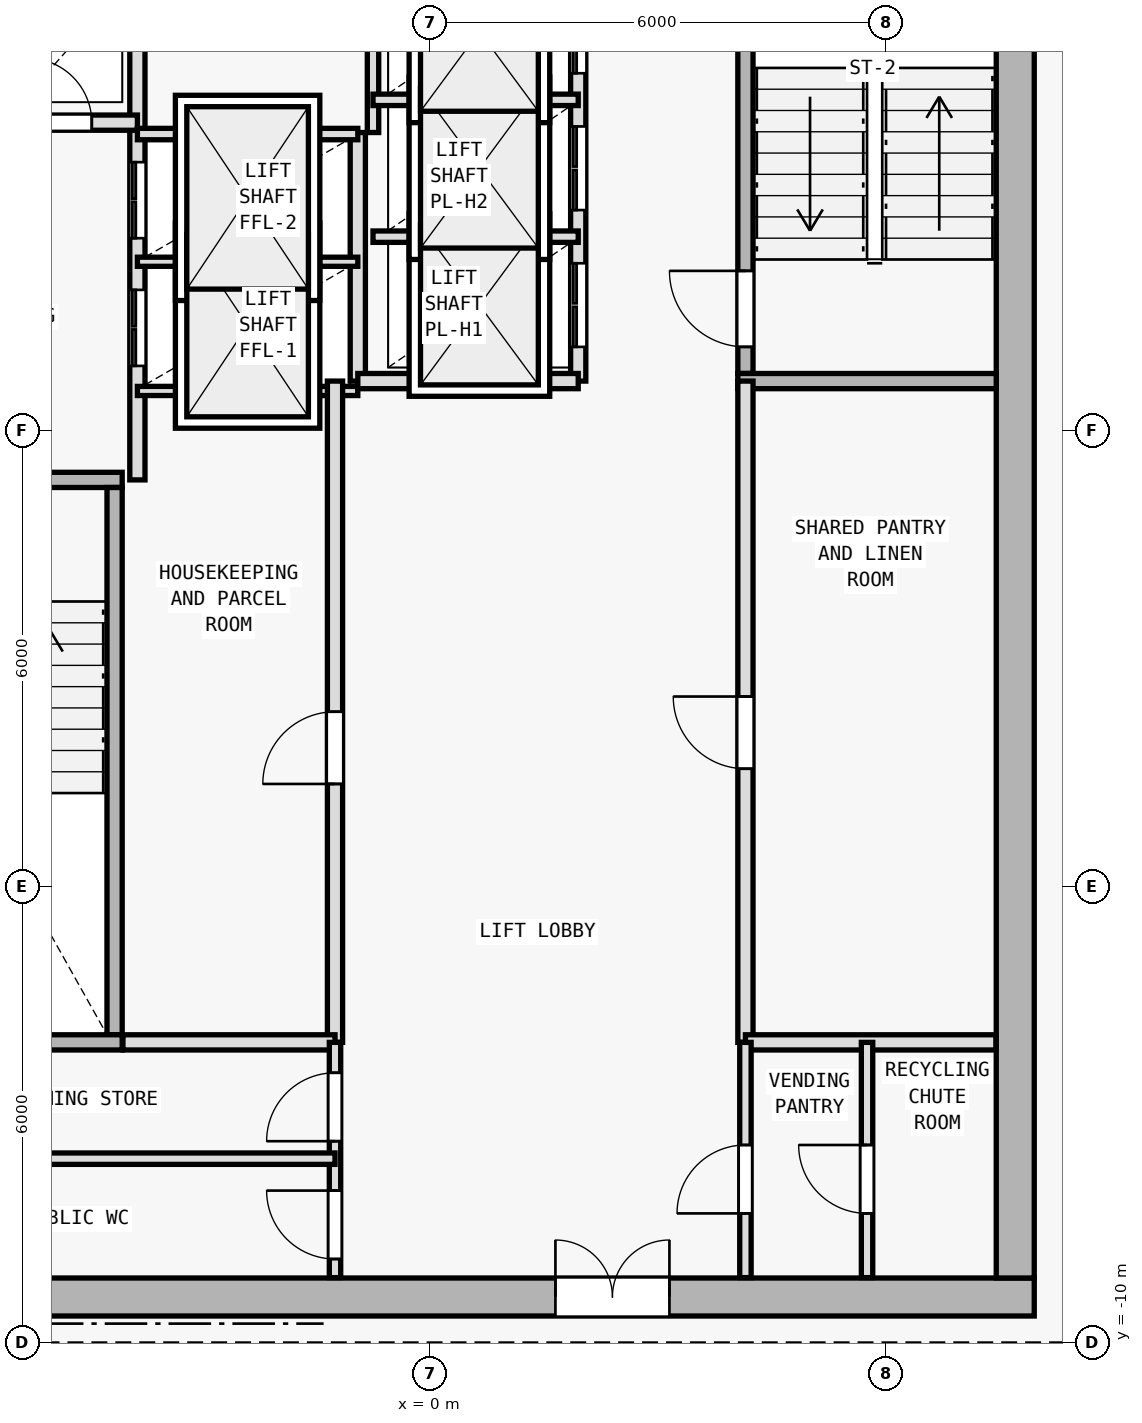
"""IFC4 building model, lengths in metres.
Left out: names, types, materials, properties, quantities, classifications, styles, units other than length and angle.
Written with IfcOpenShell. Run it as: python <this file> out.ifc"""

import sys

from ifc_helpers import new_model, si_unit, direction, frame, frame_2d, origin, origin_2d, place, context, subcontext, project, spatial, rectangle, i_section, extrude, element, fill, save


model = new_model("IFC4")
c1 = context("Model", 3, precision=1e-05, world=origin(), true_north=direction((0.0, 1.0)))
c2 = subcontext(c1, "Body", "Model", "MODEL_VIEW")
j1 = project(units=[si_unit("LENGTHUNIT", "METRE"), si_unit("PLANEANGLEUNIT", "RADIAN")], contexts=[c1])
p1 = place(None, origin())
s1 = spatial("IfcSite", under=j1, at=p1, CompositionType="ELEMENT")
p2 = place(p1, origin())
s2 = spatial("IfcBuilding", under=s1, at=p2, CompositionType="ELEMENT")
p3 = place(p2, frame((0.0, 0.0, 286.8)))
s3 = spatial("IfcBuildingStorey", under=s2, at=p3, CompositionType="ELEMENT", Elevation=286.8)
for number, where, z_axis, x_axis in (
    (1, (7.7, -9.4, 0.0), (0.0, 0.0, 1.0), (1.0, 0.0, 0.0)),
    (2, (0.0, -9.4, 0.0), (0.0, 0.0, 1.0), (1.0, 0.0, 0.0)),
    (3, (7.7, 0.4, 0.0), (0.0, 0.0, 1.0), (1.0, 0.0, 0.0)),
):
    element("IfcColumn", number, at=place(p3, frame(where, z_axis=z_axis, x_axis=x_axis)), inside=s3, PredefinedType="COLUMN", context=c2, shape_type="SweptSolid", body=[
        extrude(i_section(OverallWidth=0.374, OverallDepth=0.372, WebThickness=0.012, FlangeThickness=0.02, FilletRadius=0.015, at=origin_2d()), origin(), (0.0, 0.0, 1.0), 3.6),
    ])
p4 = place(p3, frame((-7.95, -9.4, 0.0), z_axis=(0.0, 0.0, 1.0), x_axis=(1.0, 0.0, 0.0)))
e4 = element("IfcWall", 4, at=p4, inside=s3, PredefinedType="SHEAR", context=c2, shape_type="SweptSolid", body=[
    extrude(rectangle(XDim=15.9, YDim=0.5, at=frame_2d((7.95, 0.0))), origin(), (0.0, 0.0, 1.0), 3.35),
])
p5 = place(p4, frame((9.6, 0.0, 0.0)))
e5 = element("IfcOpeningElement", 5, at=p5, cuts=e4, PredefinedType="OPENING", context=c2, shape_type="SweptSolid", body=[
    extrude(rectangle(XDim=1.5, YDim=2.2, at=frame_2d((0.75, 1.1))), frame((0.0, 0.26, 0.0), z_axis=(0.0, -1.0, 0.0), x_axis=(1.0, 0.0, 0.0)), (0.0, 0.0, 1.0), 0.52),
])
p6 = place(p3, frame((7.7, 9.95, 0.0), z_axis=(0.0, 0.0, 1.0), x_axis=(0.0, -1.0, 0.0)))
e6 = element("IfcWall", 6, at=p6, inside=s3, PredefinedType="SHEAR", context=c2, shape_type="SweptSolid", body=[
    extrude(rectangle(XDim=19.1, YDim=0.5, at=frame_2d((9.55, 0.0))), origin(), (0.0, 0.0, 1.0), 3.35),
])
p7 = place(p3, frame((-7.45, 1.35, 0.0), z_axis=(0.0, 0.0, 1.0), x_axis=(1.0, 0.0, 0.0)))
e7 = element("IfcWall", 7, at=p7, inside=s3, PredefinedType="SOLIDWALL", context=c2, shape_type="SweptSolid", body=[
    extrude(rectangle(XDim=3.4, YDim=0.2, at=frame_2d((1.7, 0.0))), origin(), (0.0, 0.0, 1.0), 3.35),
])
p8 = place(p7, frame((0.65, 0.0, 0.0)))
e8 = element("IfcOpeningElement", 8, at=p8, cuts=e7, PredefinedType="OPENING", context=c2, shape_type="SweptSolid", body=[
    extrude(rectangle(XDim=1.0, YDim=2.15, at=frame_2d((0.5, 1.075))), frame((0.0, 0.11, 0.0), z_axis=(0.0, -1.0, 0.0), x_axis=(1.0, 0.0, 0.0)), (0.0, 0.0, 1.0), 0.22),
])
p9 = place(p3, frame((-4.15, -5.95, 0.0), z_axis=(0.0, 0.0, 1.0), x_axis=(0.0, 1.0, 0.0)))
e9 = element("IfcWall", 9, at=p9, inside=s3, PredefinedType="SOLIDWALL", context=c2, shape_type="SweptSolid", body=[
    extrude(rectangle(XDim=7.2, YDim=0.2, at=frame_2d((3.6, 0.0))), origin(), (0.0, 0.0, 1.0), 3.35),
])
p10 = place(p3, frame((-3.85, 1.35, 0.0), z_axis=(0.0, 0.0, 1.0), x_axis=(0.0, 1.0, 0.0)))
e10 = element("IfcWall", 10, at=p10, inside=s3, PredefinedType="SOLIDWALL", context=c2, shape_type="SweptSolid", body=[
    extrude(rectangle(XDim=8.595, YDim=0.2, at=frame_2d((4.297, 0.0))), origin(), (0.0, 0.0, 1.0), 3.35),
])
p11 = place(p10, frame((1.5, 0.0, 0.0)))
e11 = element("IfcOpeningElement", 11, at=p11, cuts=e10, PredefinedType="OPENING", context=c2, shape_type="SweptSolid", body=[
    extrude(rectangle(XDim=1.0, YDim=2.15, at=frame_2d((0.5, 1.075))), frame((0.0, 0.11, 0.0), z_axis=(0.0, -1.0, 0.0), x_axis=(1.0, 0.0, 0.0)), (0.0, 0.0, 1.0), 0.22),
])
p12 = place(p10, frame((3.18, 0.0, 0.0)))
e12 = element("IfcOpeningElement", 12, at=p12, cuts=e10, PredefinedType="OPENING", context=c2, shape_type="SweptSolid", body=[
    extrude(rectangle(XDim=1.0, YDim=2.15, at=frame_2d((0.5, 1.075))), frame((0.0, 0.11, 0.0), z_axis=(0.0, -1.0, 0.0), x_axis=(1.0, 0.0, 0.0)), (0.0, 0.0, 1.0), 0.22),
])
p13 = place(p3, frame((-7.445, 6.05, 0.0), z_axis=(0.0, 0.0, 1.0), x_axis=(1.0, 0.0, 0.0)))
e13 = element("IfcWall", 13, at=p13, inside=s3, PredefinedType="SOLIDWALL", context=c2, shape_type="SweptSolid", body=[
    extrude(rectangle(XDim=3.595, YDim=0.2, at=frame_2d((1.797, 0.0))), origin(), (0.0, 0.0, 1.0), 3.35),
])
p14 = place(p13, frame((0.345, 0.0, 0.0)))
e14 = element("IfcOpeningElement", 14, at=p14, cuts=e13, PredefinedType="OPENING", context=c2, shape_type="SweptSolid", body=[
    extrude(rectangle(XDim=0.85, YDim=2.1, at=frame_2d((0.425, 1.05))), frame((0.0, 0.11, 0.0), z_axis=(0.0, -1.0, 0.0), x_axis=(1.0, 0.0, 0.0)), (0.0, 0.0, 1.0), 0.22),
])
p15 = place(p13, frame((2.145, 0.0, 0.0)))
e15 = element("IfcOpeningElement", 15, at=p15, cuts=e13, PredefinedType="OPENING", context=c2, shape_type="SweptSolid", body=[
    extrude(rectangle(XDim=0.85, YDim=2.1, at=frame_2d((0.425, 1.05))), frame((0.0, 0.11, 0.0), z_axis=(0.0, -1.0, 0.0), x_axis=(1.0, 0.0, 0.0)), (0.0, 0.0, 1.0), 0.22),
])
p16 = place(p3, frame((4.15, 2.75, 0.0), z_axis=(0.0, 0.0, 1.0), x_axis=(0.0, 1.0, 0.0)))
e16 = element("IfcWall", 16, at=p16, inside=s3, PredefinedType="SOLIDWALL", context=c2, shape_type="SweptSolid", body=[
    extrude(rectangle(XDim=7.2, YDim=0.2, at=frame_2d((3.6, 0.0))), origin(), (0.0, 0.0, 1.0), 3.35),
])
p17 = place(p16, frame((0.35, 0.0, 0.0)))
e17 = element("IfcOpeningElement", 17, at=p17, cuts=e16, PredefinedType="OPENING", context=c2, shape_type="SweptSolid", body=[
    extrude(rectangle(XDim=1.0, YDim=2.15, at=frame_2d((0.5, 1.075))), frame((0.0, 0.11, 0.0), z_axis=(0.0, -1.0, 0.0), x_axis=(1.0, 0.0, 0.0)), (0.0, 0.0, 1.0), 0.22),
])
p18 = place(p3, frame((4.05, 2.65, 0.0), z_axis=(0.0, 0.0, 1.0), x_axis=(1.0, 0.0, 0.0)))
e18 = element("IfcWall", 18, at=p18, inside=s3, PredefinedType="SOLIDWALL", context=c2, shape_type="SweptSolid", body=[
    extrude(rectangle(XDim=3.4, YDim=0.2, at=frame_2d((1.7, 0.0))), origin(), (0.0, 0.0, 1.0), 3.35),
])
p19 = place(p3, frame((-0.95, 2.65, 0.0), z_axis=(0.0, 0.0, 1.0), x_axis=(0.0, 1.0, 0.0)))
e19 = element("IfcWall", 19, at=p19, inside=s3, PredefinedType="SOLIDWALL", context=c2, shape_type="SweptSolid", body=[
    extrude(rectangle(XDim=3.27, YDim=0.2, at=frame_2d((1.635, 0.0))), origin(), (0.0, 0.0, 1.0), 3.35),
])
for number, where, z_axis, x_axis in (
    (20, (-3.85, 2.52, 0.0), (0.0, 0.0, 1.0), (1.0, 0.0, 0.0)),
    (21, (-3.85, 4.22, 0.0), (0.0, 0.0, 1.0), (1.0, 0.0, 0.0)),
):
    element("IfcWall", number, at=place(p3, frame(where, z_axis=z_axis, x_axis=x_axis)), inside=s3, PredefinedType="PARTITIONING", context=c2, shape_type="SweptSolid", body=[
        extrude(rectangle(XDim=2.9, YDim=0.12, at=frame_2d((1.45, 0.0))), origin(), (0.0, 0.0, 1.0), 3.35),
    ])
p20 = place(p3, frame((-3.85, 5.9, 0.0), z_axis=(0.0, 0.0, 1.0), x_axis=(1.0, 0.0, 0.0)))
e22 = element("IfcWall", 22, at=p20, inside=s3, PredefinedType="PARTITIONING", context=c2, shape_type="SweptSolid", body=[
    extrude(rectangle(XDim=2.9, YDim=0.15, at=frame_2d((1.45, 0.0))), origin(), (0.0, 0.0, 1.0), 3.35),
])
p21 = place(p3, frame((4.15, -6.05, 0.0), z_axis=(0.0, 0.0, 1.0), x_axis=(0.0, 1.0, 0.0)))
e23 = element("IfcWall", 23, at=p21, inside=s3, PredefinedType="SOLIDWALL", context=c2, shape_type="SweptSolid", body=[
    extrude(rectangle(XDim=8.7, YDim=0.2, at=frame_2d((4.35, 0.0))), origin(), (0.0, 0.0, 1.0), 3.35),
])
p22 = place(p21, frame((3.6, 0.0, 0.0)))
e24 = element("IfcOpeningElement", 24, at=p22, cuts=e23, PredefinedType="OPENING", context=c2, shape_type="SweptSolid", body=[
    extrude(rectangle(XDim=0.95, YDim=2.1, at=frame_2d((0.475, 1.05))), frame((0.0, 0.11, 0.0), z_axis=(0.0, -1.0, 0.0), x_axis=(1.0, 0.0, 0.0)), (0.0, 0.0, 1.0), 0.22),
])
p23 = place(p3, frame((-1.25, -6.05, 0.0), z_axis=(0.0, 0.0, 1.0), x_axis=(0.0, 1.0, 0.0)))
e25 = element("IfcWall", 25, at=p23, inside=s3, PredefinedType="SOLIDWALL", context=c2, shape_type="SweptSolid", body=[
    extrude(rectangle(XDim=8.7, YDim=0.2, at=frame_2d((4.35, 0.0))), origin(), (0.0, 0.0, 1.0), 3.35),
])
p24 = place(p23, frame((3.4, 0.0, 0.0)))
e26 = element("IfcOpeningElement", 26, at=p24, cuts=e25, PredefinedType="OPENING", context=c2, shape_type="SweptSolid", body=[
    extrude(rectangle(XDim=0.95, YDim=2.1, at=frame_2d((0.475, 1.05))), frame((0.0, 0.11, 0.0), z_axis=(0.0, -1.0, 0.0), x_axis=(1.0, 0.0, 0.0)), (0.0, 0.0, 1.0), 0.22),
])
p25 = place(p3, frame((1.95, 2.65, 0.0), z_axis=(0.0, 0.0, 1.0), x_axis=(0.0, 1.0, 0.0)))
e27 = element("IfcWall", 27, at=p25, inside=s3, PredefinedType="SOLIDWALL", context=c2, shape_type="SweptSolid", body=[
    extrude(rectangle(XDim=7.295, YDim=0.2, at=frame_2d((3.647, 0.0))), origin(), (0.0, 0.0, 1.0), 3.35),
])
p26 = place(p25, frame((0.45, 0.0, 0.0)))
e28 = element("IfcOpeningElement", 28, at=p26, cuts=e27, PredefinedType="OPENING", context=c2, shape_type="SweptSolid", body=[
    extrude(rectangle(XDim=1.1, YDim=2.15, at=frame_2d((0.55, 1.075))), frame((0.0, 0.11, 0.0), z_axis=(0.0, -1.0, 0.0), x_axis=(1.0, 0.0, 0.0)), (0.0, 0.0, 1.0), 0.22),
])
p27 = place(p25, frame((2.25, 0.0, 0.0)))
e29 = element("IfcOpeningElement", 29, at=p27, cuts=e27, PredefinedType="OPENING", context=c2, shape_type="SweptSolid", body=[
    extrude(rectangle(XDim=1.1, YDim=2.15, at=frame_2d((0.55, 1.075))), frame((0.0, 0.11, 0.0), z_axis=(0.0, -1.0, 0.0), x_axis=(1.0, 0.0, 0.0)), (0.0, 0.0, 1.0), 0.22),
])
p28 = place(p25, frame((4.05, 0.0, 0.0)))
e30 = element("IfcOpeningElement", 30, at=p28, cuts=e27, PredefinedType="OPENING", context=c2, shape_type="SweptSolid", body=[
    extrude(rectangle(XDim=1.1, YDim=2.15, at=frame_2d((0.55, 1.075))), frame((0.0, 0.11, 0.0), z_axis=(0.0, -1.0, 0.0), x_axis=(1.0, 0.0, 0.0)), (0.0, 0.0, 1.0), 0.22),
])
p29 = place(p25, frame((5.85, 0.0, 0.0)))
e31 = element("IfcOpeningElement", 31, at=p29, cuts=e27, PredefinedType="OPENING", context=c2, shape_type="SweptSolid", body=[
    extrude(rectangle(XDim=1.1, YDim=2.15, at=frame_2d((0.55, 1.075))), frame((0.0, 0.11, 0.0), z_axis=(0.0, -1.0, 0.0), x_axis=(1.0, 0.0, 0.0)), (0.0, 0.0, 1.0), 0.22),
])
p30 = place(p3, frame((-0.95, 2.65, 0.0), z_axis=(0.0, 0.0, 1.0), x_axis=(1.0, 0.0, 0.0)))
e32 = element("IfcWall", 32, at=p30, inside=s3, PredefinedType="SOLIDWALL", context=c2, shape_type="SweptSolid", body=[
    extrude(rectangle(XDim=2.9, YDim=0.2, at=frame_2d((1.45, 0.0))), origin(), (0.0, 0.0, 1.0), 3.35),
])
p31 = place(p3, frame((-0.75, 5.92, 0.0), z_axis=(0.0, 0.0, 1.0), x_axis=(0.0, 1.0, 0.0)))
e33 = element("IfcWall", 33, at=p31, inside=s3, PredefinedType="PARTITIONING", context=c2, shape_type="SweptSolid", body=[
    extrude(rectangle(XDim=4.025, YDim=0.15, at=frame_2d((2.013, 0.0))), origin(), (0.0, 0.0, 1.0), 3.35),
])
for number, where, z_axis, x_axis in (
    (34, (-0.75, 4.55, 0.0), (0.0, 0.0, 1.0), (1.0, 0.0, 0.0)),
    (35, (-0.75, 6.35, 0.0), (0.0, 0.0, 1.0), (1.0, 0.0, 0.0)),
):
    element("IfcWall", number, at=place(p3, frame(where, z_axis=z_axis, x_axis=x_axis)), inside=s3, PredefinedType="PARTITIONING", context=c2, shape_type="SweptSolid", body=[
        extrude(rectangle(XDim=2.7, YDim=0.15, at=frame_2d((1.35, 0.0))), origin(), (0.0, 0.0, 1.0), 3.35),
    ])
p32 = place(p3, frame((-7.45, -6.05, 0.0), z_axis=(0.0, 0.0, 1.0), x_axis=(1.0, 0.0, 0.0)))
e36 = element("IfcWall", 36, at=p32, inside=s3, PredefinedType="SOLIDWALL", context=c2, shape_type="SweptSolid", body=[
    extrude(rectangle(XDim=3.4, YDim=0.2, at=frame_2d((1.7, 0.0))), origin(), (0.0, 0.0, 1.0), 3.35),
])
p33 = place(p3, frame((-4.04, -6.05, 0.0), z_axis=(0.0, 0.0, 1.0), x_axis=(1.0, 0.0, 0.0)))
e37 = element("IfcWall", 37, at=p33, inside=s3, PredefinedType="SOLIDWALL", context=c2, shape_type="SweptSolid", body=[
    extrude(rectangle(XDim=2.79, YDim=0.2, at=frame_2d((1.395, 0.0))), origin(), (0.0, 0.0, 1.0), 3.35),
])
p34 = place(p3, frame((4.15, -6.05, 0.0), z_axis=(0.0, 0.0, 1.0), x_axis=(1.0, 0.0, 0.0)))
e38 = element("IfcWall", 38, at=p34, inside=s3, PredefinedType="SOLIDWALL", context=c2, shape_type="SweptSolid", body=[
    extrude(rectangle(XDim=3.295, YDim=0.2, at=frame_2d((1.647, 0.0))), origin(), (0.0, 0.0, 1.0), 3.35),
])
p35 = place(p3, frame((-1.25, -9.145, 0.0), z_axis=(0.0, 0.0, 1.0), x_axis=(0.0, 1.0, 0.0)))
e39 = element("IfcWall", 39, at=p35, inside=s3, PredefinedType="PARTITIONING", context=c2, shape_type="SweptSolid", body=[
    extrude(rectangle(XDim=3.095, YDim=0.15, at=frame_2d((1.547, 0.0))), origin(), (0.0, 0.0, 1.0), 3.35),
])
p36 = place(p35, frame((1.795, 0.0, 0.0)))
e40 = element("IfcOpeningElement", 40, at=p36, cuts=e39, PredefinedType="OPENING", context=c2, shape_type="SweptSolid", body=[
    extrude(rectangle(XDim=0.9, YDim=2.1, at=frame_2d((0.45, 1.05))), frame((0.0, 0.085, 0.0), z_axis=(0.0, -1.0, 0.0), x_axis=(1.0, 0.0, 0.0)), (0.0, 0.0, 1.0), 0.17),
])
p37 = place(p35, frame((0.245, 0.0, 0.0)))
e41 = element("IfcOpeningElement", 41, at=p37, cuts=e39, PredefinedType="OPENING", context=c2, shape_type="SweptSolid", body=[
    extrude(rectangle(XDim=0.9, YDim=2.1, at=frame_2d((0.45, 1.05))), frame((0.0, 0.085, 0.0), z_axis=(0.0, -1.0, 0.0), x_axis=(1.0, 0.0, 0.0)), (0.0, 0.0, 1.0), 0.17),
])
p38 = place(p3, frame((4.15, -9.145, 0.0), z_axis=(0.0, 0.0, 1.0), x_axis=(0.0, 1.0, 0.0)))
e42 = element("IfcWall", 42, at=p38, inside=s3, PredefinedType="PARTITIONING", context=c2, shape_type="SweptSolid", body=[
    extrude(rectangle(XDim=3.095, YDim=0.15, at=frame_2d((1.547, 0.0))), origin(), (0.0, 0.0, 1.0), 3.35),
])
p39 = place(p38, frame((0.845, 0.0, 0.0)))
e43 = element("IfcOpeningElement", 43, at=p39, cuts=e42, PredefinedType="OPENING", context=c2, shape_type="SweptSolid", body=[
    extrude(rectangle(XDim=0.9, YDim=2.1, at=frame_2d((0.45, 1.05))), frame((0.0, 0.085, 0.0), z_axis=(0.0, -1.0, 0.0), x_axis=(1.0, 0.0, 0.0)), (0.0, 0.0, 1.0), 0.17),
])
p40 = place(p3, frame((-7.445, -7.58, 0.0), z_axis=(0.0, 0.0, 1.0), x_axis=(1.0, 0.0, 0.0)))
e44 = element("IfcWall", 44, at=p40, inside=s3, PredefinedType="PARTITIONING", context=c2, shape_type="SweptSolid", body=[
    extrude(rectangle(XDim=6.195, YDim=0.15, at=frame_2d((3.098, 0.0))), origin(), (0.0, 0.0, 1.0), 3.35),
])
p41 = place(p3, frame((5.75, -9.145, 0.0), z_axis=(0.0, 0.0, 1.0), x_axis=(0.0, 1.0, 0.0)))
e45 = element("IfcWall", 45, at=p41, inside=s3, PredefinedType="PARTITIONING", context=c2, shape_type="SweptSolid", body=[
    extrude(rectangle(XDim=3.095, YDim=0.15, at=frame_2d((1.547, 0.0))), origin(), (0.0, 0.0, 1.0), 3.35),
])
p42 = place(p41, frame((0.845, 0.0, 0.0)))
e46 = element("IfcOpeningElement", 46, at=p42, cuts=e45, PredefinedType="OPENING", context=c2, shape_type="SweptSolid", body=[
    extrude(rectangle(XDim=0.9, YDim=2.1, at=frame_2d((0.45, 1.05))), frame((0.0, 0.085, 0.0), z_axis=(0.0, -1.0, 0.0), x_axis=(1.0, 0.0, 0.0)), (0.0, 0.0, 1.0), 0.17),
])
p43 = place(p5, origin())
e47 = element("IfcDoor", 47, at=p43, inside=s3, OperationType="DOUBLE_DOOR_SINGLE_SWING", PredefinedType="DOOR", context=c2, shape_type="SweptSolid", body=[
    extrude(rectangle(XDim=1.5, YDim=2.2, at=frame_2d((0.75, 1.1))), frame((0.0, 0.025, 0.0), z_axis=(0.0, -1.0, 0.0), x_axis=(1.0, 0.0, 0.0)), (0.0, 0.0, 1.0), 0.05),
])
fill(e5, e47)
p44 = place(p15, origin())
e48 = element("IfcDoor", 48, at=p44, inside=s3, OperationType="SINGLE_SWING_LEFT", PredefinedType="DOOR", context=c2, shape_type="SweptSolid", body=[
    extrude(rectangle(XDim=0.85, YDim=2.1, at=frame_2d((0.425, 1.05))), frame((0.0, 0.025, 0.0), z_axis=(0.0, -1.0, 0.0), x_axis=(1.0, 0.0, 0.0)), (0.0, 0.0, 1.0), 0.05),
])
fill(e15, e48)
p45 = place(p17, origin())
e49 = element("IfcDoor", 49, at=p45, inside=s3, OperationType="SINGLE_SWING_RIGHT", PredefinedType="DOOR", context=c2, shape_type="SweptSolid", body=[
    extrude(rectangle(XDim=1.0, YDim=2.15, at=frame_2d((0.5, 1.075))), frame((0.0, 0.025, 0.0), z_axis=(0.0, -1.0, 0.0), x_axis=(1.0, 0.0, 0.0)), (0.0, 0.0, 1.0), 0.05),
])
fill(e17, e49)
p46 = place(p22, origin())
e50 = element("IfcDoor", 50, at=p46, inside=s3, OperationType="SINGLE_SWING_RIGHT", PredefinedType="DOOR", context=c2, shape_type="SweptSolid", body=[
    extrude(rectangle(XDim=0.95, YDim=2.1, at=frame_2d((0.475, 1.05))), frame((0.0, 0.025, 0.0), z_axis=(0.0, -1.0, 0.0), x_axis=(1.0, 0.0, 0.0)), (0.0, 0.0, 1.0), 0.05),
])
fill(e24, e50)
p47 = place(p24, origin())
e51 = element("IfcDoor", 51, at=p47, inside=s3, OperationType="SINGLE_SWING_LEFT", PredefinedType="DOOR", context=c2, shape_type="SweptSolid", body=[
    extrude(rectangle(XDim=0.95, YDim=2.1, at=frame_2d((0.475, 1.05))), frame((0.0, 0.025, 0.0), z_axis=(0.0, -1.0, 0.0), x_axis=(1.0, 0.0, 0.0)), (0.0, 0.0, 1.0), 0.05),
])
fill(e26, e51)
p48 = place(p26, origin())
e52 = element("IfcDoor", 52, at=p48, inside=s3, OperationType="DOUBLE_DOOR_SLIDING", PredefinedType="DOOR", context=c2, shape_type="SweptSolid", body=[
    extrude(rectangle(XDim=1.1, YDim=2.15, at=frame_2d((0.55, 1.075))), frame((0.0, 0.025, 0.0), z_axis=(0.0, -1.0, 0.0), x_axis=(1.0, 0.0, 0.0)), (0.0, 0.0, 1.0), 0.05),
])
fill(e28, e52)
p49 = place(p27, origin())
e53 = element("IfcDoor", 53, at=p49, inside=s3, OperationType="DOUBLE_DOOR_SLIDING", PredefinedType="DOOR", context=c2, shape_type="SweptSolid", body=[
    extrude(rectangle(XDim=1.1, YDim=2.15, at=frame_2d((0.55, 1.075))), frame((0.0, 0.025, 0.0), z_axis=(0.0, -1.0, 0.0), x_axis=(1.0, 0.0, 0.0)), (0.0, 0.0, 1.0), 0.05),
])
fill(e29, e53)
p50 = place(p28, origin())
e54 = element("IfcDoor", 54, at=p50, inside=s3, OperationType="DOUBLE_DOOR_SLIDING", PredefinedType="DOOR", context=c2, shape_type="SweptSolid", body=[
    extrude(rectangle(XDim=1.1, YDim=2.15, at=frame_2d((0.55, 1.075))), frame((0.0, 0.025, 0.0), z_axis=(0.0, -1.0, 0.0), x_axis=(1.0, 0.0, 0.0)), (0.0, 0.0, 1.0), 0.05),
])
fill(e30, e54)
p51 = place(p11, origin())
e55 = element("IfcDoor", 55, at=p51, inside=s3, OperationType="DOUBLE_DOOR_SLIDING", PredefinedType="DOOR", context=c2, shape_type="SweptSolid", body=[
    extrude(rectangle(XDim=1.0, YDim=2.15, at=frame_2d((0.5, 1.075))), frame((0.0, 0.025, 0.0), z_axis=(0.0, -1.0, 0.0), x_axis=(1.0, 0.0, 0.0)), (0.0, 0.0, 1.0), 0.05),
])
fill(e11, e55)
p52 = place(p12, origin())
e56 = element("IfcDoor", 56, at=p52, inside=s3, OperationType="DOUBLE_DOOR_SLIDING", PredefinedType="DOOR", context=c2, shape_type="SweptSolid", body=[
    extrude(rectangle(XDim=1.0, YDim=2.15, at=frame_2d((0.5, 1.075))), frame((0.0, 0.025, 0.0), z_axis=(0.0, -1.0, 0.0), x_axis=(1.0, 0.0, 0.0)), (0.0, 0.0, 1.0), 0.05),
])
fill(e12, e56)
p53 = place(p36, origin())
e57 = element("IfcDoor", 57, at=p53, inside=s3, OperationType="SINGLE_SWING_LEFT", PredefinedType="DOOR", context=c2, shape_type="SweptSolid", body=[
    extrude(rectangle(XDim=0.9, YDim=2.1, at=frame_2d((0.45, 1.05))), frame((0.0, 0.025, 0.0), z_axis=(0.0, -1.0, 0.0), x_axis=(1.0, 0.0, 0.0)), (0.0, 0.0, 1.0), 0.05),
])
fill(e40, e57)
p54 = place(p37, origin())
e58 = element("IfcDoor", 58, at=p54, inside=s3, OperationType="SINGLE_SWING_RIGHT", PredefinedType="DOOR", context=c2, shape_type="SweptSolid", body=[
    extrude(rectangle(XDim=0.9, YDim=2.1, at=frame_2d((0.45, 1.05))), frame((0.0, 0.025, 0.0), z_axis=(0.0, -1.0, 0.0), x_axis=(1.0, 0.0, 0.0)), (0.0, 0.0, 1.0), 0.05),
])
fill(e41, e58)
p55 = place(p39, origin())
e59 = element("IfcDoor", 59, at=p55, inside=s3, OperationType="SINGLE_SWING_LEFT", PredefinedType="DOOR", context=c2, shape_type="SweptSolid", body=[
    extrude(rectangle(XDim=0.9, YDim=2.1, at=frame_2d((0.45, 1.05))), frame((0.0, 0.025, 0.0), z_axis=(0.0, -1.0, 0.0), x_axis=(1.0, 0.0, 0.0)), (0.0, 0.0, 1.0), 0.05),
])
fill(e43, e59)
p56 = place(p42, origin())
e60 = element("IfcDoor", 60, at=p56, inside=s3, OperationType="SINGLE_SWING_RIGHT", PredefinedType="DOOR", context=c2, shape_type="SweptSolid", body=[
    extrude(rectangle(XDim=0.9, YDim=2.1, at=frame_2d((0.45, 1.05))), frame((0.0, 0.025, 0.0), z_axis=(0.0, -1.0, 0.0), x_axis=(1.0, 0.0, 0.0)), (0.0, 0.0, 1.0), 0.05),
])
fill(e46, e60)
save(model, sys.argv[1])
